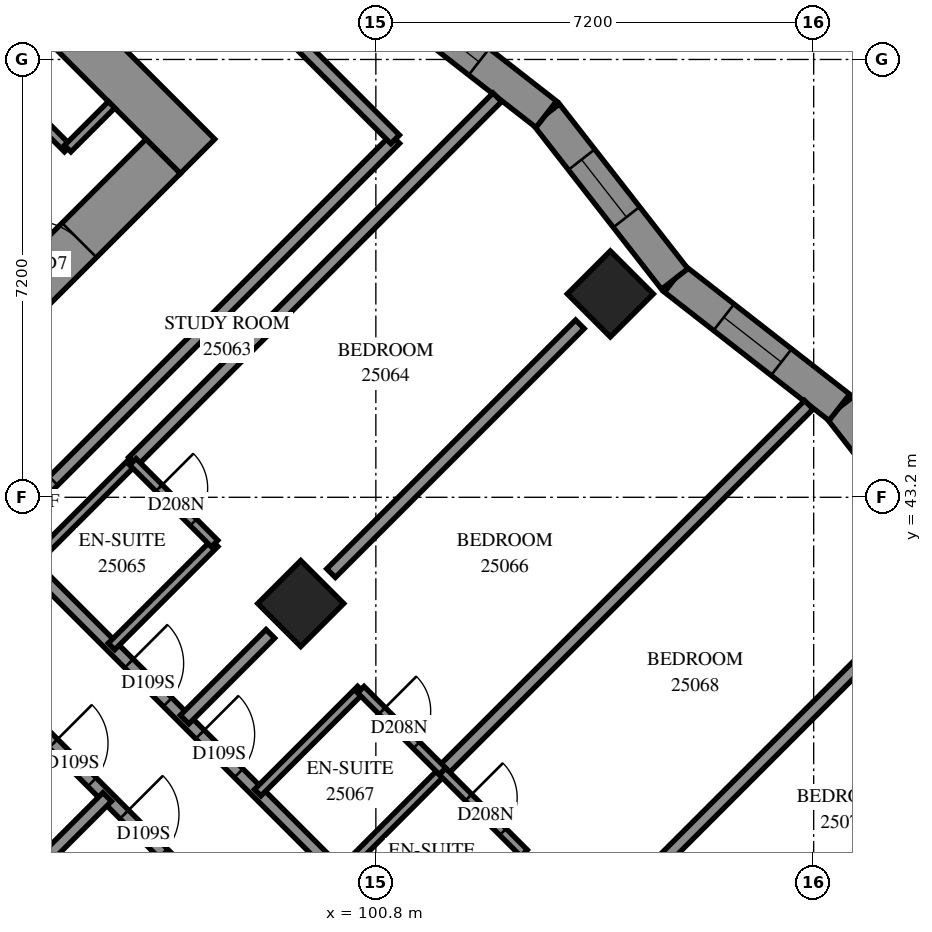
"""IFC4 building model, lengths in metres.
Left out: names, types, materials, properties, quantities, classifications, styles, units other than length and angle.
Written with IfcOpenShell. Run it as: python <this file> out.ifc"""

import sys

from ifc_helpers import new_model, si_unit, direction, frame, frame_2d, origin, origin_2d, place, context, subcontext, project, spatial, polyline, rectangle, outline, extrude, element, fill, save


model = new_model("IFC4")
c1 = context("Model", 3, precision=1e-05, world=origin(), true_north=direction((0.0, 1.0)))
c2 = subcontext(c1, "Body", "Model", "MODEL_VIEW")
j1 = project(units=[si_unit("LENGTHUNIT", "METRE"), si_unit("PLANEANGLEUNIT", "RADIAN")], contexts=[c1])
p1 = place(None, origin())
s1 = spatial("IfcSite", under=j1, at=p1, CompositionType="ELEMENT")
p2 = place(p1, origin())
s2 = spatial("IfcBuilding", under=s1, at=p2, CompositionType="ELEMENT")
p3 = place(p2, frame((0.0, 0.0, 94.8)))
s3 = spatial("IfcBuildingStorey", under=s2, at=p3, CompositionType="ELEMENT", Elevation=94.8)
for number, where, z_axis, x_axis in (
    (1, (104.656, 46.544, 0.0), (0.0, 0.0, 1.0), (0.707, -0.707, 0.0)),
    (2, (99.565, 41.453, 0.0), (0.0, 0.0, 1.0), (0.707, -0.707, 0.0)),
):
    element("IfcColumn", number, at=place(p3, frame(where, z_axis=z_axis, x_axis=x_axis)), inside=s3, PredefinedType="COLUMN", context=c2, shape_type="SweptSolid", body=[
        extrude(rectangle(XDim=1.0, YDim=1.0, at=origin_2d()), origin(), (0.0, 0.0, 1.0), 3.1),
    ])
p4 = place(p3, frame((86.554, 60.121, -0.3), z_axis=(0.0, 0.0, 1.0), x_axis=(0.7071067812, -0.7071067812, 0.0)))
e3 = element("IfcWall", 3, at=p4, inside=s3, PredefinedType="SHEAR", context=c2, shape_type="SweptSolid", body=[
    extrude(rectangle(XDim=16.0, YDim=0.8, at=frame_2d((8.0, 0.0))), origin(), (0.0, 0.0, 1.0), 2.7),
])
p5 = place(p4, frame((10.8, 0.0, 0.3)))
e4 = element("IfcOpeningElement", 4, at=p5, cuts=e3, PredefinedType="OPENING", context=c2, shape_type="SweptSolid", body=[
    extrude(rectangle(XDim=0.8, YDim=2.1, at=frame_2d((0.4, 1.05))), frame((0.0, 0.41, 0.0), z_axis=(0.0, -1.0, 0.0), x_axis=(1.0, 0.0, 0.0)), (0.0, 0.0, 1.0), 0.82),
])
p6 = place(p3, frame((87.12, 38.625, -0.3), z_axis=(0.0, 0.0, 1.0), x_axis=(0.7071067812, 0.7071067812, 0.0)))
e5 = element("IfcWall", 5, at=p6, inside=s3, PredefinedType="SHEAR", context=c2, shape_type="SweptSolid", body=[
    extrude(rectangle(XDim=14.4, YDim=0.8, at=frame_2d((7.2, 0.0))), origin(), (0.0, 0.0, 1.0), 2.7),
])
p7 = place(p6, frame((4.55, 0.0, 0.3)))
e6 = element("IfcOpeningElement", 6, at=p7, cuts=e5, PredefinedType="OPENING", context=c2, shape_type="SweptSolid", body=[
    extrude(rectangle(XDim=1.1, YDim=2.1, at=frame_2d((0.55, 1.05))), frame((0.0, 0.41, 0.0), z_axis=(0.0, -1.0, 0.0), x_axis=(1.0, 0.0, 0.0)), (0.0, 0.0, 1.0), 0.82),
])
p8 = place(p6, frame((11.35, 0.0, 0.3)))
e7 = element("IfcOpeningElement", 7, at=p8, cuts=e5, PredefinedType="OPENING", context=c2, shape_type="SweptSolid", body=[
    extrude(rectangle(XDim=1.1, YDim=2.1, at=frame_2d((0.55, 1.05))), frame((0.0, 0.41, 0.0), z_axis=(0.0, -1.0, 0.0), x_axis=(1.0, 0.0, 0.0)), (0.0, 0.0, 1.0), 0.82),
])
p9 = place(p3, frame((110.55, 41.951, 0.0), z_axis=(0.0, 0.0, 1.0), x_axis=(-0.6150990344, 0.7884498576, 0.0)))
e8 = element("IfcWall", 8, at=p9, inside=s3, PredefinedType="SOLIDWALL", context=c2, shape_type="SweptSolid", body=[
    extrude(outline(polyline([(0.058, -0.275), (3.492, -0.275), (3.424, 0.275), (-0.058, 0.275), (0.058, -0.275)])), origin(), (0.0, 0.0, 1.0), 3.1),
])
p10 = place(p9, frame((1.112, 0.0, 0.5)))
e9 = element("IfcOpeningElement", 9, at=p10, cuts=e8, PredefinedType="OPENING", context=c2, shape_type="SweptSolid", body=[
    extrude(rectangle(XDim=1.2, YDim=2.45, at=frame_2d((0.6, 1.225))), frame((0.0, 0.285, 0.0), z_axis=(0.0, -1.0, 0.0), x_axis=(1.0, 0.0, 0.0)), (0.0, 0.0, 1.0), 0.57),
])
p11 = place(p3, frame((108.422, 44.678, 0.0), z_axis=(0.0, 0.0, 1.0), x_axis=(-0.788454577, 0.6150929849, 0.0)))
e10 = element("IfcWall", 10, at=p11, inside=s3, PredefinedType="SOLIDWALL", context=c2, shape_type="SweptSolid", body=[
    extrude(outline(polyline([(-0.034, -0.275), (3.401, -0.275), (3.468, 0.275), (0.034, 0.275), (-0.034, -0.275)])), origin(), (0.0, 0.0, 1.0), 3.1),
])
p12 = place(p11, frame((1.21, 0.0, 0.5)))
e11 = element("IfcOpeningElement", 11, at=p12, cuts=e10, PredefinedType="OPENING", context=c2, shape_type="SweptSolid", body=[
    extrude(rectangle(XDim=1.2, YDim=2.45, at=frame_2d((0.6, 1.225))), frame((0.0, 0.285, 0.0), z_axis=(0.0, -1.0, 0.0), x_axis=(1.0, 0.0, 0.0)), (0.0, 0.0, 1.0), 0.57),
])
p13 = place(p3, frame((105.715, 46.791, 0.0), z_axis=(0.0, 0.0, 1.0), x_axis=(-0.6150788643, 0.7884655926, 0.0)))
e12 = element("IfcWall", 12, at=p13, inside=s3, PredefinedType="SOLIDWALL", context=c2, shape_type="SweptSolid", body=[
    extrude(outline(polyline([(0.034, -0.275), (3.468, -0.275), (3.401, 0.275), (-0.034, 0.275), (0.034, -0.275)])), origin(), (0.0, 0.0, 1.0), 3.1),
])
p14 = place(p13, frame((1.29, 0.0, 0.5)))
e13 = element("IfcOpeningElement", 13, at=p14, cuts=e12, PredefinedType="OPENING", context=c2, shape_type="SweptSolid", body=[
    extrude(rectangle(XDim=1.2, YDim=2.45, at=frame_2d((0.6, 1.225))), frame((0.0, 0.285, 0.0), z_axis=(0.0, -1.0, 0.0), x_axis=(1.0, 0.0, 0.0)), (0.0, 0.0, 1.0), 0.57),
])
p15 = place(p3, frame((103.602, 49.499, 0.0), z_axis=(0.0, 0.0, 1.0), x_axis=(-0.788454577, 0.6150929849, 0.0)))
e14 = element("IfcWall", 14, at=p15, inside=s3, PredefinedType="SOLIDWALL", context=c2, shape_type="SweptSolid", body=[
    extrude(outline(polyline([(-0.034, -0.275), (3.401, -0.275), (3.468, 0.275), (0.034, 0.275), (-0.034, -0.275)])), origin(), (0.0, 0.0, 1.0), 3.1),
])
p16 = place(p15, frame((1.403, 0.0, 0.5)))
e15 = element("IfcOpeningElement", 15, at=p16, cuts=e14, PredefinedType="OPENING", context=c2, shape_type="SweptSolid", body=[
    extrude(rectangle(XDim=1.2, YDim=2.45, at=frame_2d((0.6, 1.225))), frame((0.0, 0.285, 0.0), z_axis=(0.0, -1.0, 0.0), x_axis=(1.0, 0.0, 0.0)), (0.0, 0.0, 1.0), 0.57),
])
p17 = place(p3, frame((91.313, 53.354, 0.0), z_axis=(0.0, 0.0, 1.0), x_axis=(0.7071147811, -0.7070987812, 0.0)))
e16 = element("IfcWall", 16, at=p17, inside=s3, PredefinedType="PARTITIONING", context=c2, shape_type="SweptSolid", body=[
    extrude(rectangle(XDim=6.25, YDim=0.15, at=frame_2d((3.125, 0.0))), origin(), (0.0, 0.0, 1.0), 3.1),
])
p18 = place(p3, frame((95.732, 48.934, 0.0), z_axis=(0.0, 0.0, 1.0), x_axis=(0.7071067812, 0.7071067812, 0.0)))
e17 = element("IfcWall", 17, at=p18, inside=s3, PredefinedType="PARTITIONING", context=c2, shape_type="SweptSolid", body=[
    extrude(rectangle(XDim=1.02, YDim=0.15, at=frame_2d((0.51, 0.0))), origin(), (0.0, 0.0, 1.0), 3.1),
])
p19 = place(p3, frame((93.339, 41.309, 0.0), z_axis=(0.0, 0.0, 1.0), x_axis=(0.7071067812, -0.7071067812, 0.0)))
e18 = element("IfcWall", 18, at=p19, inside=s3, PredefinedType="PARTITIONING", context=c2, shape_type="SweptSolid", body=[
    extrude(rectangle(XDim=18.702, YDim=0.2, at=frame_2d((9.351, 0.0))), origin(), (0.0, 0.0, 1.0), 3.1),
])
p20 = place(p19, frame((3.05, 0.0, 0.0)))
e19 = element("IfcOpeningElement", 19, at=p20, cuts=e18, PredefinedType="OPENING", context=c2, shape_type="SweptSolid", body=[
    extrude(rectangle(XDim=0.9, YDim=2.1, at=frame_2d((0.45, 1.05))), frame((0.0, 0.11, 0.0), z_axis=(0.0, -1.0, 0.0), x_axis=(1.0, 0.0, 0.0)), (0.0, 0.0, 1.0), 0.22),
])
p21 = place(p19, frame((4.7, 0.0, 0.0)))
e20 = element("IfcOpeningElement", 20, at=p21, cuts=e18, PredefinedType="OPENING", context=c2, shape_type="SweptSolid", body=[
    extrude(rectangle(XDim=0.9, YDim=2.1, at=frame_2d((0.45, 1.05))), frame((0.0, 0.11, 0.0), z_axis=(0.0, -1.0, 0.0), x_axis=(1.0, 0.0, 0.0)), (0.0, 0.0, 1.0), 0.22),
])
p22 = place(p19, frame((10.149, 0.0, 0.0)))
e21 = element("IfcOpeningElement", 21, at=p22, cuts=e18, PredefinedType="OPENING", context=c2, shape_type="SweptSolid", body=[
    extrude(rectangle(XDim=0.9, YDim=2.1, at=frame_2d((0.45, 1.05))), frame((0.0, 0.11, 0.0), z_axis=(0.0, -1.0, 0.0), x_axis=(1.0, 0.0, 0.0)), (0.0, 0.0, 1.0), 0.22),
])
p23 = place(p19, frame((11.9, 0.0, 0.0)))
e22 = element("IfcOpeningElement", 22, at=p23, cuts=e18, PredefinedType="OPENING", context=c2, shape_type="SweptSolid", body=[
    extrude(rectangle(XDim=0.9, YDim=2.1, at=frame_2d((0.45, 1.05))), frame((0.0, 0.11, 0.0), z_axis=(0.0, -1.0, 0.0), x_axis=(1.0, 0.0, 0.0)), (0.0, 0.0, 1.0), 0.22),
])
p24 = place(p19, frame((17.45, 0.0, 0.0)))
e23 = element("IfcOpeningElement", 23, at=p24, cuts=e18, PredefinedType="OPENING", context=c2, shape_type="SweptSolid", body=[
    extrude(rectangle(XDim=0.9, YDim=2.1, at=frame_2d((0.45, 1.05))), frame((0.0, 0.11, 0.0), z_axis=(0.0, -1.0, 0.0), x_axis=(1.0, 0.0, 0.0)), (0.0, 0.0, 1.0), 0.22),
])
p25 = place(p3, frame((94.615, 42.587, 0.0), z_axis=(0.0, 0.0, 1.0), x_axis=(0.7071067812, 0.7071067812, 0.0)))
e24 = element("IfcWall", 24, at=p25, inside=s3, PredefinedType="PARTITIONING", context=c2, shape_type="SweptSolid", body=[
    extrude(rectangle(XDim=9.198, YDim=0.2, at=frame_2d((4.599, 0.0))), origin(), (0.0, 0.0, 1.0), 3.1),
])
p26 = place(p25, frame((0.248, 0.0, 0.0)))
e25 = element("IfcOpeningElement", 25, at=p26, cuts=e24, PredefinedType="OPENING", context=c2, shape_type="SweptSolid", body=[
    extrude(rectangle(XDim=1.0, YDim=2.1, at=frame_2d((0.5, 1.05))), frame((0.0, 0.11, 0.0), z_axis=(0.0, -1.0, 0.0), x_axis=(1.0, 0.0, 0.0)), (0.0, 0.0, 1.0), 0.22),
])
p27 = place(p3, frame((101.896, 38.698, 0.0), z_axis=(0.0, 0.0, 1.0), x_axis=(0.7072241589, 0.706989384, 0.0)))
e26 = element("IfcWall", 26, at=p27, inside=s3, PredefinedType="PARTITIONING", context=c2, shape_type="SweptSolid", body=[
    extrude(rectangle(XDim=8.519, YDim=0.2, at=frame_2d((4.259, 0.0))), origin(), (0.0, 0.0, 1.0), 3.1),
])
p28 = place(p3, frame((96.805, 43.787, 0.0), z_axis=(0.0, 0.0, 1.0), x_axis=(0.7071126822, 0.7071008801, 0.0)))
e27 = element("IfcWall", 27, at=p28, inside=s3, PredefinedType="PARTITIONING", context=c2, shape_type="SweptSolid", body=[
    extrude(rectangle(XDim=8.473, YDim=0.2, at=frame_2d((4.237, 0.0))), origin(), (0.0, 0.0, 1.0), 3.1),
])
p29 = place(p3, frame((94.62, 42.587, 0.0), z_axis=(0.0, 0.0, 1.0), x_axis=(0.7071067812, -0.7071067812, 0.0)))
e28 = element("IfcWall", 28, at=p29, inside=s3, PredefinedType="PARTITIONING", context=c2, shape_type="SweptSolid", body=[
    extrude(rectangle(XDim=7.9, YDim=0.2, at=frame_2d((3.95, 0.0))), origin(), (0.0, 0.0, 1.0), 3.1),
])
p30 = place(p29, frame((2.998, 0.0, 0.0)))
e29 = element("IfcOpeningElement", 29, at=p30, cuts=e28, PredefinedType="OPENING", context=c2, shape_type="SweptSolid", body=[
    extrude(rectangle(XDim=0.9, YDim=2.1, at=frame_2d((0.45, 1.05))), frame((0.0, 0.11, 0.0), z_axis=(0.0, -1.0, 0.0), x_axis=(1.0, 0.0, 0.0)), (0.0, 0.0, 1.0), 0.22),
])
p31 = place(p29, frame((4.649, 0.0, 0.0)))
e30 = element("IfcOpeningElement", 30, at=p31, cuts=e28, PredefinedType="OPENING", context=c2, shape_type="SweptSolid", body=[
    extrude(rectangle(XDim=0.9, YDim=2.1, at=frame_2d((0.45, 1.05))), frame((0.0, 0.11, 0.0), z_axis=(0.0, -1.0, 0.0), x_axis=(1.0, 0.0, 0.0)), (0.0, 0.0, 1.0), 0.22),
])
for number, where, z_axis, x_axis in (
    (31, (105.155, 36.863, 0.0), (0.0, 0.0, 1.0), (0.707, 0.707, 0.0)),
    (32, (100.063, 41.953, 0.0), (0.0, 0.0, 1.0), (0.707, 0.707, 0.0)),
):
    element("IfcWall", number, at=place(p3, frame(where, z_axis=z_axis, x_axis=x_axis)), inside=s3, PredefinedType="PARTITIONING", context=c2, shape_type="SweptSolid", body=[
        extrude(rectangle(XDim=5.787, YDim=0.2, at=frame_2d((2.893, 0.0))), origin(), (0.0, 0.0, 1.0), 3.1),
    ])
p32 = place(p3, frame((99.071, 51.133, 0.0), z_axis=(0.0, 0.0, 1.0), x_axis=(0.7071067812, -0.7071067812, 0.0)))
e33 = element("IfcWall", 33, at=p32, inside=s3, PredefinedType="PARTITIONING", context=c2, shape_type="SweptSolid", body=[
    extrude(rectangle(XDim=2.893, YDim=0.2, at=frame_2d((1.447, 0.0))), origin(), (0.0, 0.0, 1.0), 3.1),
])
p33 = place(p3, frame((100.203, 36.997, 0.0), z_axis=(0.0, 0.0, 1.0), x_axis=(0.706689978, 0.7075233388, 0.0)))
e34 = element("IfcWall", 34, at=p33, inside=s3, PredefinedType="PARTITIONING", context=c2, shape_type="SweptSolid", body=[
    extrude(rectangle(XDim=2.4, YDim=0.15, at=frame_2d((1.2, 0.0))), origin(), (0.0, 0.0, 1.0), 3.1),
])
for number, where, z_axis, x_axis in (
    (35, (96.453, 40.747, 0.0), (0.0, 0.0, 1.0), (0.707, 0.707, 0.0)),
    (36, (95.109, 42.091, 0.0), (0.0, 0.0, 1.0), (0.707, 0.707, 0.0)),
    (37, (98.857, 38.343, 0.0), (0.0, 0.0, 1.0), (0.707, 0.707, 0.0)),
    (38, (101.545, 35.657, 0.0), (0.0, 0.0, 1.0), (0.707, 0.707, 0.0)),
):
    element("IfcWall", number, at=place(p3, frame(where, z_axis=z_axis, x_axis=x_axis)), inside=s3, PredefinedType="PARTITIONING", context=c2, shape_type="SweptSolid", body=[
        extrude(rectangle(XDim=2.398, YDim=0.15, at=frame_2d((1.199, 0.0))), origin(), (0.0, 0.0, 1.0), 3.1),
    ])
for number, where, z_axis, x_axis in (
    (39, (97.655, 39.545, 0.0), (0.0, 0.0, 1.0), (0.707, 0.707, 0.0)),
    (40, (94.972, 36.862, 0.0), (0.0, 0.0, 1.0), (0.707, 0.707, 0.0)),
):
    element("IfcWall", number, at=place(p3, frame(where, z_axis=z_axis, x_axis=x_axis)), inside=s3, PredefinedType="PARTITIONING", context=c2, shape_type="SweptSolid", body=[
        extrude(rectangle(XDim=1.994, YDim=0.2, at=frame_2d((0.997, 0.0))), origin(), (0.0, 0.0, 1.0), 3.1),
    ])
p34 = place(p3, frame((96.803, 43.783, 0.0), z_axis=(0.0, 0.0, 1.0), x_axis=(0.7071067812, -0.7071067812, 0.0)))
e41 = element("IfcWall", 41, at=p34, inside=s3, PredefinedType="PARTITIONING", context=c2, shape_type="SweptSolid", body=[
    extrude(rectangle(XDim=1.901, YDim=0.15, at=frame_2d((0.95, 0.0))), origin(), (0.0, 0.0, 1.0), 3.1),
])
p35 = place(p34, frame((0.609, 0.0, 0.0)))
e42 = element("IfcOpeningElement", 42, at=p35, cuts=e41, PredefinedType="OPENING", context=c2, shape_type="SweptSolid", body=[
    extrude(rectangle(XDim=0.8, YDim=2.1, at=frame_2d((0.4, 1.05))), frame((0.0, 0.085, 0.0), z_axis=(0.0, -1.0, 0.0), x_axis=(1.0, 0.0, 0.0)), (0.0, 0.0, 1.0), 0.17),
])
p36 = place(p3, frame((101.894, 38.693, 0.0), z_axis=(0.0, 0.0, 1.0), x_axis=(0.7071067812, -0.7071067812, 0.0)))
e43 = element("IfcWall", 43, at=p36, inside=s3, PredefinedType="PARTITIONING", context=c2, shape_type="SweptSolid", body=[
    extrude(rectangle(XDim=1.901, YDim=0.15, at=frame_2d((0.95, 0.0))), origin(), (0.0, 0.0, 1.0), 3.1),
])
p37 = place(p36, frame((0.608, 0.0, 0.0)))
e44 = element("IfcOpeningElement", 44, at=p37, cuts=e43, PredefinedType="OPENING", context=c2, shape_type="SweptSolid", body=[
    extrude(rectangle(XDim=0.8, YDim=2.1, at=frame_2d((0.4, 1.05))), frame((0.0, 0.085, 0.0), z_axis=(0.0, -1.0, 0.0), x_axis=(1.0, 0.0, 0.0)), (0.0, 0.0, 1.0), 0.17),
])
p38 = place(p3, frame((100.553, 40.037, 0.0), z_axis=(0.0, 0.0, 1.0), x_axis=(0.7076330979, -0.7065800724, 0.0)))
e45 = element("IfcWall", 45, at=p38, inside=s3, PredefinedType="PARTITIONING", context=c2, shape_type="SweptSolid", body=[
    extrude(rectangle(XDim=1.899, YDim=0.15, at=frame_2d((0.95, 0.0))), origin(), (0.0, 0.0, 1.0), 3.1),
])
p39 = place(p38, frame((0.493, 0.0, 0.0)))
e46 = element("IfcOpeningElement", 46, at=p39, cuts=e45, PredefinedType="OPENING", context=c2, shape_type="SweptSolid", body=[
    extrude(rectangle(XDim=0.8, YDim=2.1, at=frame_2d((0.4, 1.05))), frame((0.0, 0.085, 0.0), z_axis=(0.0, -1.0, 0.0), x_axis=(1.0, 0.0, 0.0)), (0.0, 0.0, 1.0), 0.17),
])
p40 = place(p12, origin())
e47 = element("IfcWindow", 47, at=p40, inside=s3, PartitioningType="SINGLE_PANEL", PredefinedType="WINDOW", context=c2, shape_type="SweptSolid", body=[
    extrude(rectangle(XDim=1.2, YDim=2.45, at=frame_2d((0.6, 1.225))), frame((0.0, 0.155, 0.0), z_axis=(0.0, -1.0, 0.0), x_axis=(1.0, 0.0, 0.0)), (0.0, 0.0, 1.0), 0.06),
])
fill(e11, e47)
p41 = place(p14, origin())
e48 = element("IfcWindow", 48, at=p41, inside=s3, PartitioningType="SINGLE_PANEL", PredefinedType="WINDOW", context=c2, shape_type="SweptSolid", body=[
    extrude(rectangle(XDim=1.2, YDim=2.45, at=frame_2d((0.6, 1.225))), frame((0.0, 0.155, 0.0), z_axis=(0.0, -1.0, 0.0), x_axis=(1.0, 0.0, 0.0)), (0.0, 0.0, 1.0), 0.06),
])
fill(e13, e48)
p42 = place(p16, origin())
e49 = element("IfcWindow", 49, at=p42, inside=s3, PartitioningType="SINGLE_PANEL", PredefinedType="WINDOW", context=c2, shape_type="SweptSolid", body=[
    extrude(rectangle(XDim=1.2, YDim=2.45, at=frame_2d((0.6, 1.225))), frame((0.0, 0.155, 0.0), z_axis=(0.0, -1.0, 0.0), x_axis=(1.0, 0.0, 0.0)), (0.0, 0.0, 1.0), 0.06),
])
fill(e15, e49)
p43 = place(p8, origin())
e50 = element("IfcDoor", 50, at=p43, inside=s3, OperationType="SINGLE_SWING_RIGHT", PredefinedType="DOOR", context=c2, shape_type="SweptSolid", body=[
    extrude(rectangle(XDim=1.1, YDim=2.1, at=frame_2d((0.55, 1.05))), frame((0.0, 0.025, 0.0), z_axis=(0.0, -1.0, 0.0), x_axis=(1.0, 0.0, 0.0)), (0.0, 0.0, 1.0), 0.05),
])
fill(e7, e50)
p44 = place(p26, origin())
e51 = element("IfcDoor", 51, at=p44, inside=s3, OperationType="SINGLE_SWING_RIGHT", PredefinedType="DOOR", context=c2, shape_type="SweptSolid", body=[
    extrude(rectangle(XDim=1.0, YDim=2.1, at=frame_2d((0.5, 1.05))), frame((0.0, 0.025, 0.0), z_axis=(0.0, -1.0, 0.0), x_axis=(1.0, 0.0, 0.0)), (0.0, 0.0, 1.0), 0.05),
])
fill(e25, e51)
p45 = place(p30, origin())
e52 = element("IfcDoor", 52, at=p45, inside=s3, OperationType="SINGLE_SWING_RIGHT", PredefinedType="DOOR", context=c2, shape_type="SweptSolid", body=[
    extrude(rectangle(XDim=0.9, YDim=2.1, at=frame_2d((0.45, 1.05))), frame((0.0, 0.025, 0.0), z_axis=(0.0, -1.0, 0.0), x_axis=(1.0, 0.0, 0.0)), (0.0, 0.0, 1.0), 0.05),
])
fill(e29, e52)
p46 = place(p35, origin())
e53 = element("IfcDoor", 53, at=p46, inside=s3, OperationType="SINGLE_SWING_RIGHT", PredefinedType="DOOR", context=c2, shape_type="SweptSolid", body=[
    extrude(rectangle(XDim=0.8, YDim=2.1, at=frame_2d((0.4, 1.05))), frame((0.0, 0.025, 0.0), z_axis=(0.0, -1.0, 0.0), x_axis=(1.0, 0.0, 0.0)), (0.0, 0.0, 1.0), 0.05),
])
fill(e42, e53)
p47 = place(p31, origin())
e54 = element("IfcDoor", 54, at=p47, inside=s3, OperationType="SINGLE_SWING_LEFT", PredefinedType="DOOR", context=c2, shape_type="SweptSolid", body=[
    extrude(rectangle(XDim=0.9, YDim=2.1, at=frame_2d((0.45, 1.05))), frame((0.0, 0.025, 0.0), z_axis=(0.0, -1.0, 0.0), x_axis=(1.0, 0.0, 0.0)), (0.0, 0.0, 1.0), 0.05),
])
fill(e30, e54)
p48 = place(p39, origin())
e55 = element("IfcDoor", 55, at=p48, inside=s3, OperationType="SINGLE_SWING_RIGHT", PredefinedType="DOOR", context=c2, shape_type="SweptSolid", body=[
    extrude(rectangle(XDim=0.8, YDim=2.1, at=frame_2d((0.4, 1.05))), frame((0.0, 0.025, 0.0), z_axis=(0.0, -1.0, 0.0), x_axis=(1.0, 0.0, 0.0)), (0.0, 0.0, 1.0), 0.05),
])
fill(e46, e55)
p49 = place(p37, origin())
e56 = element("IfcDoor", 56, at=p49, inside=s3, OperationType="SINGLE_SWING_RIGHT", PredefinedType="DOOR", context=c2, shape_type="SweptSolid", body=[
    extrude(rectangle(XDim=0.8, YDim=2.1, at=frame_2d((0.4, 1.05))), frame((0.0, 0.025, 0.0), z_axis=(0.0, -1.0, 0.0), x_axis=(1.0, 0.0, 0.0)), (0.0, 0.0, 1.0), 0.05),
])
fill(e44, e56)
p50 = place(p20, origin())
e57 = element("IfcDoor", 57, at=p50, inside=s3, OperationType="SINGLE_SWING_LEFT", PredefinedType="DOOR", context=c2, shape_type="SweptSolid", body=[
    extrude(rectangle(XDim=0.9, YDim=2.1, at=frame_2d((0.45, 1.05))), frame((0.0, 0.025, 0.0), z_axis=(0.0, -1.0, 0.0), x_axis=(1.0, 0.0, 0.0)), (0.0, 0.0, 1.0), 0.05),
])
fill(e19, e57)
p51 = place(p21, origin())
e58 = element("IfcDoor", 58, at=p51, inside=s3, OperationType="SINGLE_SWING_RIGHT", PredefinedType="DOOR", context=c2, shape_type="SweptSolid", body=[
    extrude(rectangle(XDim=0.9, YDim=2.1, at=frame_2d((0.45, 1.05))), frame((0.0, 0.025, 0.0), z_axis=(0.0, -1.0, 0.0), x_axis=(1.0, 0.0, 0.0)), (0.0, 0.0, 1.0), 0.05),
])
fill(e20, e58)
save(model, sys.argv[1])
